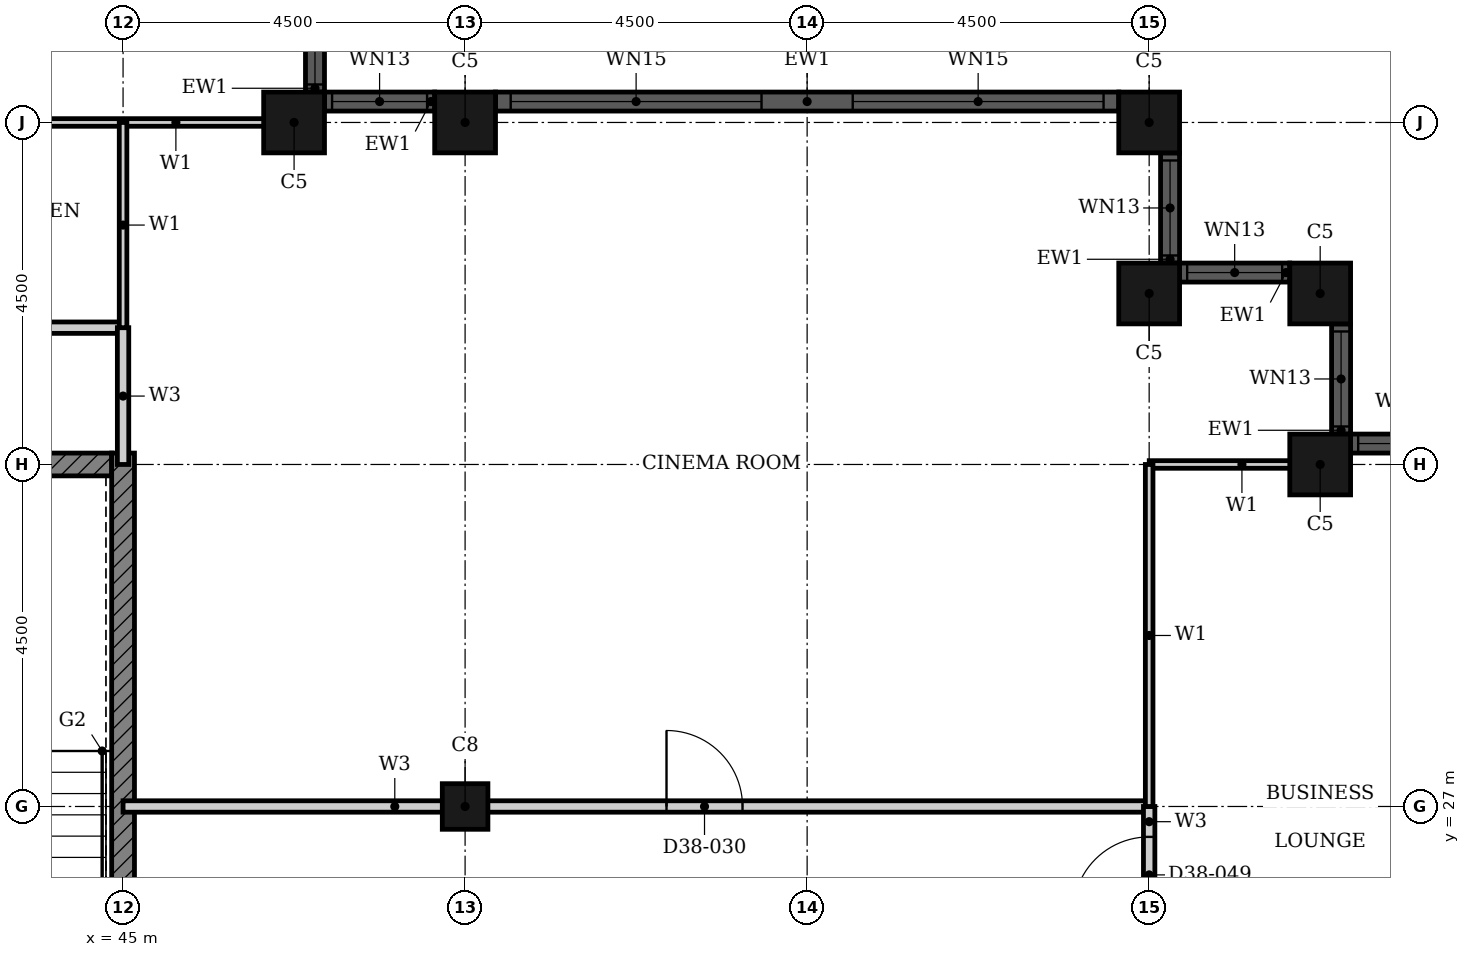
"""IFC4 building model, lengths in metres.
Left out: names, types, materials, properties, quantities, classifications, styles, units other than length and angle.
Written with IfcOpenShell. Run it as: python <this file> out.ifc"""

import sys

from ifc_helpers import new_model, si_unit, direction, frame, frame_2d, origin, origin_2d, place, context, subcontext, project, spatial, rectangle, hollow_rectangle, extrude, element, fill, save


model = new_model("IFC4")
c1 = context("Model", 3, precision=1e-05, world=origin(), true_north=direction((0.0, 1.0)))
c2 = subcontext(c1, "Body", "Model", "MODEL_VIEW")
j1 = project(units=[si_unit("LENGTHUNIT", "METRE"), si_unit("PLANEANGLEUNIT", "RADIAN")], contexts=[c1])
p1 = place(None, origin())
s1 = spatial("IfcSite", under=j1, at=p1, CompositionType="ELEMENT")
p2 = place(p1, origin())
s2 = spatial("IfcBuilding", under=s1, at=p2, CompositionType="ELEMENT")
p3 = place(p2, frame((0.0, 0.0, 154.3)))
s3 = spatial("IfcBuildingStorey", under=s2, at=p3, CompositionType="ELEMENT", Elevation=154.3)
for number, where, z_axis, x_axis in (
    (1, (60.75, 31.5, 0.0), (0.0, 0.0, 1.0), (1.0, 0.0, 0.0)),
    (2, (60.75, 33.75, 0.0), (0.0, 0.0, 1.0), (1.0, 0.0, 0.0)),
    (3, (58.5, 33.75, 0.0), (0.0, 0.0, 1.0), (1.0, 0.0, 0.0)),
    (4, (58.5, 36.0, 0.0), (0.0, 0.0, 1.0), (1.0, 0.0, 0.0)),
    (5, (49.5, 36.0, 0.0), (0.0, 0.0, 1.0), (1.0, 0.0, 0.0)),
    (6, (47.25, 36.0, 0.0), (0.0, 0.0, 1.0), (1.0, 0.0, 0.0)),
):
    element("IfcColumn", number, at=place(p3, frame(where, z_axis=z_axis, x_axis=x_axis)), inside=s3, PredefinedType="COLUMN", context=c2, shape_type="SweptSolid", body=[
        extrude(hollow_rectangle(XDim=0.8, YDim=0.8, WallThickness=0.025, at=origin_2d()), origin(), (0.0, 0.0, 1.0), 3.7),
    ])
p4 = place(p3, frame((49.5, 27.0, 0.0), z_axis=(0.0, 0.0, 1.0), x_axis=(1.0, 0.0, 0.0)))
e7 = element("IfcColumn", 7, at=p4, inside=s3, PredefinedType="COLUMN", context=c2, shape_type="SweptSolid", body=[
    extrude(hollow_rectangle(XDim=0.6, YDim=0.6, WallThickness=0.02, at=origin_2d()), origin(), (0.0, 0.0, 1.0), 3.7),
])
p5 = place(p3, frame((62.6, 31.775, 0.0), z_axis=(0.0, 0.0, 1.0), x_axis=(-1.0, 0.0, 0.0)))
e8 = element("IfcWall", 8, at=p5, inside=s3, PredefinedType="SOLIDWALL", context=c2, shape_type="SweptSolid", body=[
    extrude(rectangle(XDim=1.45, YDim=0.25, at=frame_2d((0.725, 0.0))), origin(), (0.0, 0.0, 1.0), 3.7),
])
p6 = place(p5, frame((0.1, 0.0, 0.9)))
e9 = element("IfcOpeningElement", 9, at=p6, cuts=e8, PredefinedType="OPENING", context=c2, shape_type="SweptSolid", body=[
    extrude(rectangle(XDim=1.25, YDim=1.85, at=frame_2d((0.625, 0.925))), frame((0.0, 0.135, 0.0), z_axis=(0.0, -1.0, 0.0), x_axis=(1.0, 0.0, 0.0)), (0.0, 0.0, 1.0), 0.27),
])
p7 = place(p3, frame((61.025, 31.9, 0.0), z_axis=(0.0, 0.0, 1.0), x_axis=(0.0, 1.0, 0.0)))
e10 = element("IfcWall", 10, at=p7, inside=s3, PredefinedType="SOLIDWALL", context=c2, shape_type="SweptSolid", body=[
    extrude(rectangle(XDim=1.45, YDim=0.25, at=frame_2d((0.725, 0.0))), origin(), (0.0, 0.0, 1.0), 3.7),
])
p8 = place(p7, frame((0.1, 0.0, 0.9)))
e11 = element("IfcOpeningElement", 11, at=p8, cuts=e10, PredefinedType="OPENING", context=c2, shape_type="SweptSolid", body=[
    extrude(rectangle(XDim=1.25, YDim=1.85, at=frame_2d((0.625, 0.925))), frame((0.0, 0.135, 0.0), z_axis=(0.0, -1.0, 0.0), x_axis=(1.0, 0.0, 0.0)), (0.0, 0.0, 1.0), 0.27),
])
p9 = place(p3, frame((60.35, 34.025, 0.0), z_axis=(0.0, 0.0, 1.0), x_axis=(-1.0, 0.0, 0.0)))
e12 = element("IfcWall", 12, at=p9, inside=s3, PredefinedType="SOLIDWALL", context=c2, shape_type="SweptSolid", body=[
    extrude(rectangle(XDim=1.45, YDim=0.25, at=frame_2d((0.725, 0.0))), origin(), (0.0, 0.0, 1.0), 3.7),
])
p10 = place(p9, frame((0.1, 0.0, 0.9)))
e13 = element("IfcOpeningElement", 13, at=p10, cuts=e12, PredefinedType="OPENING", context=c2, shape_type="SweptSolid", body=[
    extrude(rectangle(XDim=1.25, YDim=1.85, at=frame_2d((0.625, 0.925))), frame((0.0, 0.135, 0.0), z_axis=(0.0, -1.0, 0.0), x_axis=(1.0, 0.0, 0.0)), (0.0, 0.0, 1.0), 0.27),
])
p11 = place(p3, frame((58.775, 34.15, 0.0), z_axis=(0.0, 0.0, 1.0), x_axis=(0.0, 1.0, 0.0)))
e14 = element("IfcWall", 14, at=p11, inside=s3, PredefinedType="SOLIDWALL", context=c2, shape_type="SweptSolid", body=[
    extrude(rectangle(XDim=1.45, YDim=0.25, at=frame_2d((0.725, 0.0))), origin(), (0.0, 0.0, 1.0), 3.7),
])
p12 = place(p11, frame((0.1, 0.0, 0.9)))
e15 = element("IfcOpeningElement", 15, at=p12, cuts=e14, PredefinedType="OPENING", context=c2, shape_type="SweptSolid", body=[
    extrude(rectangle(XDim=1.25, YDim=1.85, at=frame_2d((0.625, 0.925))), frame((0.0, 0.135, 0.0), z_axis=(0.0, -1.0, 0.0), x_axis=(1.0, 0.0, 0.0)), (0.0, 0.0, 1.0), 0.27),
])
p13 = place(p3, frame((58.1, 36.275, 0.0), z_axis=(0.0, 0.0, 1.0), x_axis=(-1.0, 0.0, 0.0)))
e16 = element("IfcWall", 16, at=p13, inside=s3, PredefinedType="SOLIDWALL", context=c2, shape_type="SweptSolid", body=[
    extrude(rectangle(XDim=8.2, YDim=0.25, at=frame_2d((4.1, 0.0))), origin(), (0.0, 0.0, 1.0), 3.7),
])
p14 = place(p13, frame((0.2, 0.0, 0.45)))
e17 = element("IfcOpeningElement", 17, at=p14, cuts=e16, PredefinedType="OPENING", context=c2, shape_type="SweptSolid", body=[
    extrude(rectangle(XDim=3.3, YDim=2.3, at=frame_2d((1.65, 1.15))), frame((0.0, 0.135, 0.0), z_axis=(0.0, -1.0, 0.0), x_axis=(1.0, 0.0, 0.0)), (0.0, 0.0, 1.0), 0.27),
])
p15 = place(p13, frame((4.7, 0.0, 0.45)))
e18 = element("IfcOpeningElement", 18, at=p15, cuts=e16, PredefinedType="OPENING", context=c2, shape_type="SweptSolid", body=[
    extrude(rectangle(XDim=3.3, YDim=2.3, at=frame_2d((1.65, 1.15))), frame((0.0, 0.135, 0.0), z_axis=(0.0, -1.0, 0.0), x_axis=(1.0, 0.0, 0.0)), (0.0, 0.0, 1.0), 0.27),
])
p16 = place(p3, frame((49.1, 36.275, 0.0), z_axis=(0.0, 0.0, 1.0), x_axis=(-1.0, 0.0, 0.0)))
e19 = element("IfcWall", 19, at=p16, inside=s3, PredefinedType="SOLIDWALL", context=c2, shape_type="SweptSolid", body=[
    extrude(rectangle(XDim=1.45, YDim=0.25, at=frame_2d((0.725, 0.0))), origin(), (0.0, 0.0, 1.0), 3.7),
])
p17 = place(p16, frame((0.1, 0.0, 0.9)))
e20 = element("IfcOpeningElement", 20, at=p17, cuts=e19, PredefinedType="OPENING", context=c2, shape_type="SweptSolid", body=[
    extrude(rectangle(XDim=1.25, YDim=1.85, at=frame_2d((0.625, 0.925))), frame((0.0, 0.135, 0.0), z_axis=(0.0, -1.0, 0.0), x_axis=(1.0, 0.0, 0.0)), (0.0, 0.0, 1.0), 0.27),
])
p18 = place(p3, frame((47.525, 36.4, 0.0), z_axis=(0.0, 0.0, 1.0), x_axis=(0.0, 1.0, 0.0)))
e21 = element("IfcWall", 21, at=p18, inside=s3, PredefinedType="SOLIDWALL", context=c2, shape_type="SweptSolid", body=[
    extrude(rectangle(XDim=1.45, YDim=0.25, at=frame_2d((0.725, 0.0))), origin(), (0.0, 0.0, 1.0), 3.7),
])
p19 = place(p18, frame((0.1, 0.0, 0.9)))
e22 = element("IfcOpeningElement", 22, at=p19, cuts=e21, PredefinedType="OPENING", context=c2, shape_type="SweptSolid", body=[
    extrude(rectangle(XDim=1.25, YDim=1.85, at=frame_2d((0.625, 0.925))), frame((0.0, 0.135, 0.0), z_axis=(0.0, -1.0, 0.0), x_axis=(1.0, 0.0, 0.0)), (0.0, 0.0, 1.0), 0.27),
])
p20 = place(p3, frame((40.625, 31.5, 0.0), z_axis=(0.0, 0.0, 1.0), x_axis=(1.0, 0.0, 0.0)))
e23 = element("IfcWall", 23, at=p20, inside=s3, PredefinedType="SHEAR", context=c2, shape_type="SweptSolid", body=[
    extrude(rectangle(XDim=4.225, YDim=0.3, at=frame_2d((2.113, 0.0))), origin(), (0.0, 0.0, 1.0), 3.4),
])
p21 = place(p3, frame((45.0, 22.35, 0.0), z_axis=(0.0, 0.0, 1.0), x_axis=(0.0, 1.0, 0.0)))
e24 = element("IfcWall", 24, at=p21, inside=s3, PredefinedType="SHEAR", context=c2, shape_type="SweptSolid", body=[
    extrude(rectangle(XDim=9.3, YDim=0.3, at=frame_2d((4.65, 0.0))), origin(), (0.0, 0.0, 1.0), 3.4),
])
p22 = place(p3, frame((45.0, 27.0, 0.0), z_axis=(0.0, 0.0, 1.0), x_axis=(1.0, 0.0, 0.0)))
e25 = element("IfcWall", 25, at=p22, inside=s3, PredefinedType="PARTITIONING", context=c2, shape_type="SweptSolid", body=[
    extrude(rectangle(XDim=13.5, YDim=0.15, at=frame_2d((6.75, 0.0))), origin(), (0.0, 0.0, 1.0), 2.68),
])
p23 = place(p22, frame((7.15, 0.0, 0.0)))
e26 = element("IfcOpeningElement", 26, at=p23, cuts=e25, PredefinedType="OPENING", context=c2, shape_type="SweptSolid", body=[
    extrude(rectangle(XDim=1.0, YDim=2.1, at=frame_2d((0.5, 1.05))), frame((0.0, 0.085, 0.0), z_axis=(0.0, -1.0, 0.0), x_axis=(1.0, 0.0, 0.0)), (0.0, 0.0, 1.0), 0.17),
])
p24 = place(p3, frame((38.4, 33.3, 0.0), z_axis=(0.0, 0.0, 1.0), x_axis=(1.0, 0.0, 0.0)))
e27 = element("IfcWall", 27, at=p24, inside=s3, PredefinedType="PARTITIONING", context=c2, shape_type="SweptSolid", body=[
    extrude(rectangle(XDim=6.6, YDim=0.15, at=frame_2d((3.3, 0.0))), origin(), (0.0, 0.0, 1.0), 3.4),
])
p25 = place(p24, frame((1.3, 0.0, 0.0)))
e28 = element("IfcOpeningElement", 28, at=p25, cuts=e27, PredefinedType="OPENING", context=c2, shape_type="SweptSolid", body=[
    extrude(rectangle(XDim=1.0, YDim=2.2, at=frame_2d((0.5, 1.1))), frame((0.0, 0.085, 0.0), z_axis=(0.0, -1.0, 0.0), x_axis=(1.0, 0.0, 0.0)), (0.0, 0.0, 1.0), 0.17),
])
p26 = place(p3, frame((45.0, 31.5, 0.0), z_axis=(0.0, 0.0, 1.0), x_axis=(0.0, 1.0, 0.0)))
e29 = element("IfcWall", 29, at=p26, inside=s3, PredefinedType="PARTITIONING", context=c2, shape_type="SweptSolid", body=[
    extrude(rectangle(XDim=1.8, YDim=0.15, at=frame_2d((0.9, 0.0))), origin(), (0.0, 0.0, 1.0), 3.4),
])
p27 = place(p3, frame((58.5, 25.2, 0.0), z_axis=(0.0, 0.0, 1.0), x_axis=(0.0, 1.0, 0.0)))
e30 = element("IfcWall", 30, at=p27, inside=s3, PredefinedType="PARTITIONING", context=c2, shape_type="SweptSolid", body=[
    extrude(rectangle(XDim=1.8, YDim=0.15, at=frame_2d((0.9, 0.0))), origin(), (0.0, 0.0, 1.0), 3.4),
])
p28 = place(p27, frame((0.4, 0.0, 0.0)))
e31 = element("IfcOpeningElement", 31, at=p28, cuts=e30, PredefinedType="OPENING", context=c2, shape_type="SweptSolid", body=[
    extrude(rectangle(XDim=1.0, YDim=2.1, at=frame_2d((0.5, 1.05))), frame((0.0, 0.085, 0.0), z_axis=(0.0, -1.0, 0.0), x_axis=(1.0, 0.0, 0.0)), (0.0, 0.0, 1.0), 0.17),
])
p29 = place(p3, frame((58.501, 31.5, 0.0), z_axis=(0.0, 0.0, 1.0), x_axis=(1.0, 0.0, 0.0)))
e32 = element("IfcWall", 32, at=p29, inside=s3, PredefinedType="PARTITIONING", context=c2, shape_type="SweptSolid", body=[
    extrude(rectangle(XDim=2.439, YDim=0.1, at=frame_2d((1.219, 0.0))), origin(), (0.0, 0.0, 1.0), 2.68),
])
p30 = place(p3, frame((42.0, 36.0, 0.0), z_axis=(0.0, 0.0, 1.0), x_axis=(1.0, 0.0, 0.0)))
e33 = element("IfcWall", 33, at=p30, inside=s3, PredefinedType="PARTITIONING", context=c2, shape_type="SweptSolid", body=[
    extrude(rectangle(XDim=5.44, YDim=0.1, at=frame_2d((2.72, 0.0))), origin(), (0.0, 0.0, 1.0), 3.4),
])
p31 = place(p30, frame((1.05, 0.0, 0.0)))
e34 = element("IfcOpeningElement", 34, at=p31, cuts=e33, PredefinedType="OPENING", context=c2, shape_type="SweptSolid", body=[
    extrude(rectangle(XDim=0.9, YDim=2.1, at=frame_2d((0.45, 1.05))), frame((0.0, 0.06, 0.0), z_axis=(0.0, -1.0, 0.0), x_axis=(1.0, 0.0, 0.0)), (0.0, 0.0, 1.0), 0.12),
])
p32 = place(p3, frame((45.0, 33.3, 0.0), z_axis=(0.0, 0.0, 1.0), x_axis=(0.0, 1.0, 0.0)))
e35 = element("IfcWall", 35, at=p32, inside=s3, PredefinedType="PARTITIONING", context=c2, shape_type="SweptSolid", body=[
    extrude(rectangle(XDim=2.7, YDim=0.1, at=frame_2d((1.35, 0.0))), origin(), (0.0, 0.0, 1.0), 3.4),
])
p33 = place(p3, frame((58.5, 27.0, 0.0), z_axis=(0.0, 0.0, 1.0), x_axis=(0.0, 1.0, 0.0)))
e36 = element("IfcWall", 36, at=p33, inside=s3, PredefinedType="PARTITIONING", context=c2, shape_type="SweptSolid", body=[
    extrude(rectangle(XDim=4.5, YDim=0.1, at=frame_2d((2.25, 0.0))), origin(), (0.0, 0.0, 1.0), 3.4),
])
p34 = place(p6, origin())
e37 = element("IfcWindow", 37, at=p34, inside=s3, PartitioningType="SINGLE_PANEL", PredefinedType="WINDOW", context=c2, shape_type="SweptSolid", body=[
    extrude(rectangle(XDim=1.25, YDim=1.85, at=frame_2d((0.625, 0.925))), frame((0.0, 0.03, 0.0), z_axis=(0.0, -1.0, 0.0), x_axis=(1.0, 0.0, 0.0)), (0.0, 0.0, 1.0), 0.06),
])
fill(e9, e37)
p35 = place(p8, origin())
e38 = element("IfcWindow", 38, at=p35, inside=s3, PartitioningType="SINGLE_PANEL", PredefinedType="WINDOW", context=c2, shape_type="SweptSolid", body=[
    extrude(rectangle(XDim=1.25, YDim=1.85, at=frame_2d((0.625, 0.925))), frame((0.0, 0.03, 0.0), z_axis=(0.0, -1.0, 0.0), x_axis=(1.0, 0.0, 0.0)), (0.0, 0.0, 1.0), 0.06),
])
fill(e11, e38)
p36 = place(p10, origin())
e39 = element("IfcWindow", 39, at=p36, inside=s3, PartitioningType="SINGLE_PANEL", PredefinedType="WINDOW", context=c2, shape_type="SweptSolid", body=[
    extrude(rectangle(XDim=1.25, YDim=1.85, at=frame_2d((0.625, 0.925))), frame((0.0, 0.03, 0.0), z_axis=(0.0, -1.0, 0.0), x_axis=(1.0, 0.0, 0.0)), (0.0, 0.0, 1.0), 0.06),
])
fill(e13, e39)
p37 = place(p12, origin())
e40 = element("IfcWindow", 40, at=p37, inside=s3, PartitioningType="SINGLE_PANEL", PredefinedType="WINDOW", context=c2, shape_type="SweptSolid", body=[
    extrude(rectangle(XDim=1.25, YDim=1.85, at=frame_2d((0.625, 0.925))), frame((0.0, 0.03, 0.0), z_axis=(0.0, -1.0, 0.0), x_axis=(1.0, 0.0, 0.0)), (0.0, 0.0, 1.0), 0.06),
])
fill(e15, e40)
p38 = place(p14, origin())
e41 = element("IfcWindow", 41, at=p38, inside=s3, PartitioningType="SINGLE_PANEL", PredefinedType="WINDOW", context=c2, shape_type="SweptSolid", body=[
    extrude(rectangle(XDim=3.3, YDim=2.3, at=frame_2d((1.65, 1.15))), frame((0.0, 0.03, 0.0), z_axis=(0.0, -1.0, 0.0), x_axis=(1.0, 0.0, 0.0)), (0.0, 0.0, 1.0), 0.06),
])
fill(e17, e41)
p39 = place(p15, origin())
e42 = element("IfcWindow", 42, at=p39, inside=s3, PartitioningType="SINGLE_PANEL", PredefinedType="WINDOW", context=c2, shape_type="SweptSolid", body=[
    extrude(rectangle(XDim=3.3, YDim=2.3, at=frame_2d((1.65, 1.15))), frame((0.0, 0.03, 0.0), z_axis=(0.0, -1.0, 0.0), x_axis=(1.0, 0.0, 0.0)), (0.0, 0.0, 1.0), 0.06),
])
fill(e18, e42)
p40 = place(p17, origin())
e43 = element("IfcWindow", 43, at=p40, inside=s3, PartitioningType="SINGLE_PANEL", PredefinedType="WINDOW", context=c2, shape_type="SweptSolid", body=[
    extrude(rectangle(XDim=1.25, YDim=1.85, at=frame_2d((0.625, 0.925))), frame((0.0, 0.03, 0.0), z_axis=(0.0, -1.0, 0.0), x_axis=(1.0, 0.0, 0.0)), (0.0, 0.0, 1.0), 0.06),
])
fill(e20, e43)
p41 = place(p19, origin())
e44 = element("IfcWindow", 44, at=p41, inside=s3, PartitioningType="SINGLE_PANEL", PredefinedType="WINDOW", context=c2, shape_type="SweptSolid", body=[
    extrude(rectangle(XDim=1.25, YDim=1.85, at=frame_2d((0.625, 0.925))), frame((0.0, 0.03, 0.0), z_axis=(0.0, -1.0, 0.0), x_axis=(1.0, 0.0, 0.0)), (0.0, 0.0, 1.0), 0.06),
])
fill(e22, e44)
p42 = place(p23, origin())
e45 = element("IfcDoor", 45, at=p42, inside=s3, OperationType="SINGLE_SWING_RIGHT", PredefinedType="DOOR", context=c2, shape_type="SweptSolid", body=[
    extrude(rectangle(XDim=1.0, YDim=2.1, at=frame_2d((0.5, 1.05))), frame((0.0, 0.025, 0.0), z_axis=(0.0, -1.0, 0.0), x_axis=(1.0, 0.0, 0.0)), (0.0, 0.0, 1.0), 0.05),
])
fill(e26, e45)
p43 = place(p28, origin())
e46 = element("IfcDoor", 46, at=p43, inside=s3, OperationType="SINGLE_SWING_RIGHT", PredefinedType="DOOR", context=c2, shape_type="SweptSolid", body=[
    extrude(rectangle(XDim=1.0, YDim=2.1, at=frame_2d((0.5, 1.05))), frame((0.0, 0.025, 0.0), z_axis=(0.0, -1.0, 0.0), x_axis=(1.0, 0.0, 0.0)), (0.0, 0.0, 1.0), 0.05),
])
fill(e31, e46)
save(model, sys.argv[1])
